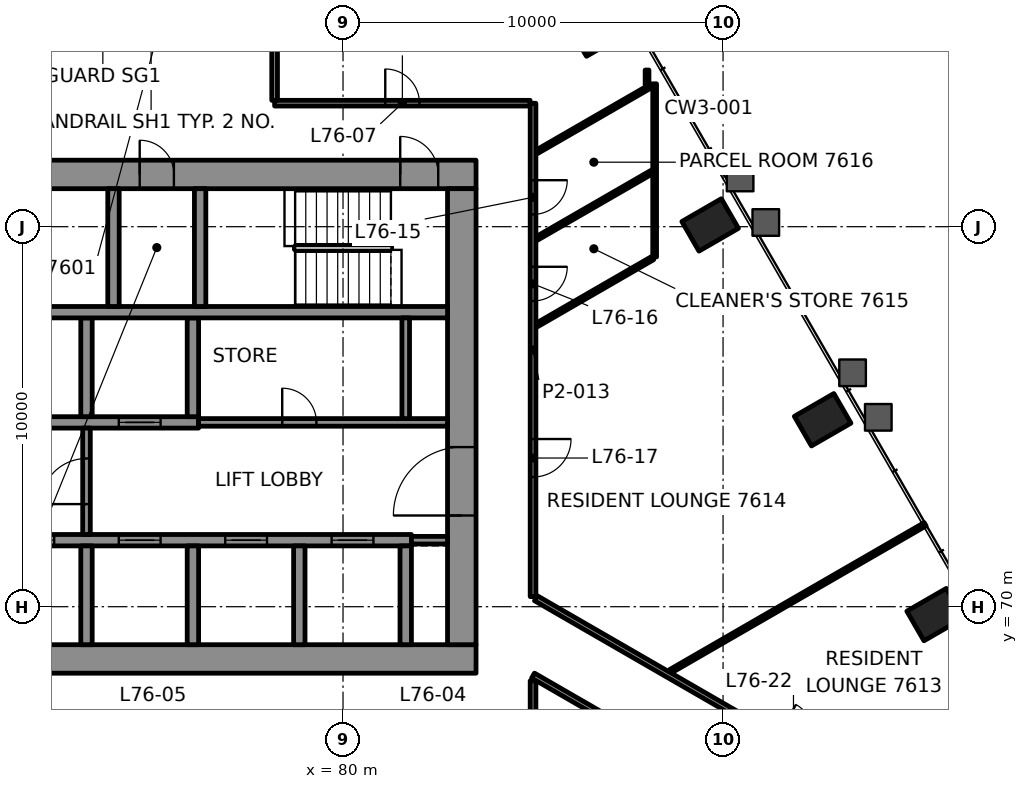
"""IFC4 building model, lengths in metres.
Left out: names, types, materials, properties, quantities, classifications, styles, units other than length and angle.
Written with IfcOpenShell. Run it as: python <this file> out.ifc"""

import sys

from ifc_helpers import new_model, si_unit, direction, frame, frame_2d, origin, origin_2d, place, context, subcontext, project, spatial, rectangle, hollow_rectangle, extrude, element, fill, save


model = new_model("IFC4")
c1 = context("Model", 3, precision=1e-05, world=origin(), true_north=direction((0.0, 1.0)))
c2 = subcontext(c1, "Body", "Model", "MODEL_VIEW")
j1 = project(units=[si_unit("LENGTHUNIT", "METRE"), si_unit("PLANEANGLEUNIT", "RADIAN")], contexts=[c1])
p1 = place(None, origin())
s1 = spatial("IfcSite", under=j1, at=p1, CompositionType="ELEMENT")
p2 = place(p1, origin())
s2 = spatial("IfcBuilding", under=s1, at=p2, CompositionType="ELEMENT")
p3 = place(p2, frame((0.0, 0.0, 312.6)))
s3 = spatial("IfcBuildingStorey", under=s2, at=p3, CompositionType="ELEMENT", Elevation=312.6)
for number, where, z_axis, x_axis in (
    (1, (95.581, 69.793, -0.0), (0.0, 0.0, 1.0), (-0.5, 0.866, 0.0)),
    (2, (92.621, 74.919, -0.0), (0.0, 0.0, 1.0), (-0.5, 0.866, 0.0)),
    (3, (89.661, 80.046, -0.0), (0.0, 0.0, 1.0), (-0.5, 0.866, 0.0)),
    (4, (86.701, 85.173, -0.0), (0.0, 0.0, 1.0), (-0.5, 0.866, 0.0)),
):
    element("IfcColumn", number, at=place(p3, frame(where, z_axis=z_axis, x_axis=x_axis)), inside=s3, PredefinedType="COLUMN", context=c2, shape_type="SweptSolid", body=[
        extrude(hollow_rectangle(XDim=0.9, YDim=1.2, WallThickness=0.06, at=origin_2d()), origin(), (0.0, 0.0, 1.0), 3.5),
    ])
p4 = place(p3, frame((66.5, 68.625, 0.0), z_axis=(0.0, 0.0, 1.0), x_axis=(1.0, 0.0, 0.0)))
e5 = element("IfcWall", 5, at=p4, inside=s3, PredefinedType="SHEAR", context=c2, shape_type="SweptSolid", body=[
    extrude(rectangle(XDim=17.0, YDim=0.75, at=frame_2d((8.5, 0.0))), origin(), (0.0, 0.0, 1.0), 3.3),
])
p5 = place(p4, frame((1.9, 0.0, 0.0)))
e6 = element("IfcOpeningElement", 6, at=p5, cuts=e5, PredefinedType="OPENING", context=c2, shape_type="SweptSolid", body=[
    extrude(rectangle(XDim=0.9, YDim=2.1, at=frame_2d((0.45, 1.05))), frame((0.0, 0.385, 0.0), z_axis=(0.0, -1.0, 0.0), x_axis=(1.0, 0.0, 0.0)), (0.0, 0.0, 1.0), 0.77),
])
p6 = place(p3, frame((66.5, 81.375, 0.0), z_axis=(0.0, 0.0, 1.0), x_axis=(1.0, 0.0, 0.0)))
e7 = element("IfcWall", 7, at=p6, inside=s3, PredefinedType="SHEAR", context=c2, shape_type="SweptSolid", body=[
    extrude(rectangle(XDim=17.0, YDim=0.75, at=frame_2d((8.5, 0.0))), origin(), (0.0, 0.0, 1.0), 3.3),
])
p7 = place(p6, frame((1.195, 0.0, 0.0)))
e8 = element("IfcOpeningElement", 8, at=p7, cuts=e7, PredefinedType="OPENING", context=c2, shape_type="SweptSolid", body=[
    extrude(rectangle(XDim=1.0, YDim=2.1, at=frame_2d((0.5, 1.05))), frame((0.0, 0.385, 0.0), z_axis=(0.0, -1.0, 0.0), x_axis=(1.0, 0.0, 0.0)), (0.0, 0.0, 1.0), 0.77),
])
p8 = place(p6, frame((15.005, 0.0, 0.0)))
e9 = element("IfcOpeningElement", 9, at=p8, cuts=e7, PredefinedType="OPENING", context=c2, shape_type="SweptSolid", body=[
    extrude(rectangle(XDim=1.0, YDim=2.1, at=frame_2d((0.5, 1.05))), frame((0.0, 0.385, 0.0), z_axis=(0.0, -1.0, 0.0), x_axis=(1.0, 0.0, 0.0)), (0.0, 0.0, 1.0), 0.77),
])
p9 = place(p6, frame((8.15, 0.0, 0.0)))
e10 = element("IfcOpeningElement", 10, at=p9, cuts=e7, PredefinedType="OPENING", context=c2, shape_type="SweptSolid", body=[
    extrude(rectangle(XDim=0.9, YDim=2.1, at=frame_2d((0.45, 1.05))), frame((0.0, 0.385, 0.0), z_axis=(0.0, -1.0, 0.0), x_axis=(1.0, 0.0, 0.0)), (0.0, 0.0, 1.0), 0.77),
])
p10 = place(p3, frame((83.125, 69.0, 0.0), z_axis=(0.0, 0.0, 1.0), x_axis=(0.0, 1.0, 0.0)))
e11 = element("IfcWall", 11, at=p10, inside=s3, PredefinedType="SHEAR", context=c2, shape_type="SweptSolid", body=[
    extrude(rectangle(XDim=12.0, YDim=0.75, at=frame_2d((6.0, 0.0))), origin(), (0.0, 0.0, 1.0), 3.3),
])
p11 = place(p10, frame((3.4, 0.0, 0.0)))
e12 = element("IfcOpeningElement", 12, at=p11, cuts=e11, PredefinedType="OPENING", context=c2, shape_type="SweptSolid", body=[
    extrude(rectangle(XDim=1.8, YDim=2.1, at=frame_2d((0.9, 1.05))), frame((0.0, 0.385, 0.0), z_axis=(0.0, -1.0, 0.0), x_axis=(1.0, 0.0, 0.0)), (0.0, 0.0, 1.0), 0.77),
])
p12 = place(p3, frame((70.3, 71.75, 0.0), z_axis=(0.0, 0.0, 1.0), x_axis=(1.0, 0.0, 0.0)))
e13 = element("IfcWall", 13, at=p12, inside=s3, PredefinedType="SHEAR", context=c2, shape_type="SweptSolid", body=[
    extrude(rectangle(XDim=11.5, YDim=0.3, at=frame_2d((5.75, 0.0))), origin(), (0.0, 0.0, 1.0), 3.3),
])
p13 = place(p12, frame((1.0, 0.0, 0.0)))
e14 = element("IfcOpeningElement", 14, at=p13, cuts=e13, PredefinedType="OPENING", context=c2, shape_type="SweptSolid", body=[
    extrude(rectangle(XDim=1.1, YDim=2.1, at=frame_2d((0.55, 1.05))), frame((0.0, 0.16, 0.0), z_axis=(0.0, -1.0, 0.0), x_axis=(1.0, 0.0, 0.0)), (0.0, 0.0, 1.0), 0.32),
])
p14 = place(p12, frame((3.8, 0.0, 0.0)))
e15 = element("IfcOpeningElement", 15, at=p14, cuts=e13, PredefinedType="OPENING", context=c2, shape_type="SweptSolid", body=[
    extrude(rectangle(XDim=1.1, YDim=2.1, at=frame_2d((0.55, 1.05))), frame((0.0, 0.16, 0.0), z_axis=(0.0, -1.0, 0.0), x_axis=(1.0, 0.0, 0.0)), (0.0, 0.0, 1.0), 0.32),
])
p15 = place(p12, frame((6.6, 0.0, 0.0)))
e16 = element("IfcOpeningElement", 16, at=p15, cuts=e13, PredefinedType="OPENING", context=c2, shape_type="SweptSolid", body=[
    extrude(rectangle(XDim=1.1, YDim=2.1, at=frame_2d((0.55, 1.05))), frame((0.0, 0.16, 0.0), z_axis=(0.0, -1.0, 0.0), x_axis=(1.0, 0.0, 0.0)), (0.0, 0.0, 1.0), 0.32),
])
p16 = place(p12, frame((9.4, 0.0, 0.0)))
e17 = element("IfcOpeningElement", 17, at=p16, cuts=e13, PredefinedType="OPENING", context=c2, shape_type="SweptSolid", body=[
    extrude(rectangle(XDim=1.1, YDim=2.1, at=frame_2d((0.55, 1.05))), frame((0.0, 0.16, 0.0), z_axis=(0.0, -1.0, 0.0), x_axis=(1.0, 0.0, 0.0)), (0.0, 0.0, 1.0), 0.32),
])
p17 = place(p3, frame((70.3, 74.85, 0.0), z_axis=(0.0, 0.0, 1.0), x_axis=(1.0, 0.0, 0.0)))
e18 = element("IfcWall", 18, at=p17, inside=s3, PredefinedType="SHEAR", context=c2, shape_type="SweptSolid", body=[
    extrude(rectangle(XDim=5.9, YDim=0.3, at=frame_2d((2.95, 0.0))), origin(), (0.0, 0.0, 1.0), 3.3),
])
p18 = place(p17, frame((3.8, 0.0, 0.0)))
e19 = element("IfcOpeningElement", 19, at=p18, cuts=e18, PredefinedType="OPENING", context=c2, shape_type="SweptSolid", body=[
    extrude(rectangle(XDim=1.1, YDim=2.1, at=frame_2d((0.55, 1.05))), frame((0.0, 0.16, 0.0), z_axis=(0.0, -1.0, 0.0), x_axis=(1.0, 0.0, 0.0)), (0.0, 0.0, 1.0), 0.32),
])
for number, where, z_axis, x_axis in (
    (20, (73.25, 69.0, 0.0), (0.0, 0.0, 1.0), (0.0, 1.0, 0.0)),
    (21, (73.25, 75.0, 0.0), (0.0, 0.0, 1.0), (0.0, 1.0, 0.0)),
    (22, (76.05, 69.0, 0.0), (0.0, 0.0, 1.0), (0.0, 1.0, 0.0)),
    (23, (76.05, 75.0, 0.0), (0.0, 0.0, 1.0), (0.0, 1.0, 0.0)),
    (24, (78.85, 69.0, 0.0), (0.0, 0.0, 1.0), (0.0, 1.0, 0.0)),
    (25, (81.65, 69.0, 0.0), (0.0, 0.0, 1.0), (0.0, 1.0, 0.0)),
):
    element("IfcWall", number, at=place(p3, frame(where, z_axis=z_axis, x_axis=x_axis)), inside=s3, PredefinedType="SHEAR", context=c2, shape_type="SweptSolid", body=[
        extrude(rectangle(XDim=2.6, YDim=0.3, at=frame_2d((1.3, 0.0))), origin(), (0.0, 0.0, 1.0), 3.3),
    ])
p19 = place(p3, frame((67.25, 77.75, 0.0), z_axis=(0.0, 0.0, 1.0), x_axis=(1.0, 0.0, 0.0)))
e26 = element("IfcWall", 26, at=p19, inside=s3, PredefinedType="SHEAR", context=c2, shape_type="SweptSolid", body=[
    extrude(rectangle(XDim=15.5, YDim=0.3, at=frame_2d((7.75, 0.0))), origin(), (0.0, 0.0, 1.0), 3.3),
])
p20 = place(p19, frame((0.445, 0.0, 0.0)))
e27 = element("IfcOpeningElement", 27, at=p20, cuts=e26, PredefinedType="OPENING", context=c2, shape_type="SweptSolid", body=[
    extrude(rectangle(XDim=1.0, YDim=2.1, at=frame_2d((0.5, 1.05))), frame((0.0, 0.16, 0.0), z_axis=(0.0, -1.0, 0.0), x_axis=(1.0, 0.0, 0.0)), (0.0, 0.0, 1.0), 0.32),
])
for number, where, z_axis, x_axis in (
    (28, (73.96, 77.9, 0.0), (0.0, 0.0, 1.0), (0.0, 1.0, 0.0)),
    (29, (76.24, 77.9, 0.0), (0.0, 0.0, 1.0), (0.0, 1.0, 0.0)),
):
    element("IfcWall", number, at=place(p3, frame(where, z_axis=z_axis, x_axis=x_axis)), inside=s3, PredefinedType="SHEAR", context=c2, shape_type="SweptSolid", body=[
        extrude(rectangle(XDim=3.1, YDim=0.3, at=frame_2d((1.55, 0.0))), origin(), (0.0, 0.0, 1.0), 3.3),
    ])
p21 = place(p3, frame((78.2, 83.25, 0.0), z_axis=(0.0, 0.0, 1.0), x_axis=(1.0, 0.0, 0.0)))
e30 = element("IfcWall", 30, at=p21, inside=s3, PredefinedType="PARTITIONING", context=c2, shape_type="SweptSolid", body=[
    extrude(rectangle(XDim=6.723, YDim=0.15, at=frame_2d((3.362, 0.0))), origin(), (0.0, 0.0, 1.0), 2.7),
])
p22 = place(p21, frame((2.911, 0.0, 0.0)))
e31 = element("IfcOpeningElement", 31, at=p22, cuts=e30, PredefinedType="OPENING", context=c2, shape_type="SweptSolid", body=[
    extrude(rectangle(XDim=0.9, YDim=2.1, at=frame_2d((0.45, 1.05))), frame((0.0, 0.085, 0.0), z_axis=(0.0, -1.0, 0.0), x_axis=(1.0, 0.0, 0.0)), (0.0, 0.0, 1.0), 0.17),
])
p23 = place(p3, frame((88.611, 68.298, 0.0), z_axis=(0.0, 0.0, 1.0), x_axis=(0.866026493871, 0.499998111909, 0.0)))
e32 = element("IfcWall", 32, at=p23, inside=s3, PredefinedType="PARTITIONING", context=c2, shape_type="SweptSolid", body=[
    extrude(rectangle(XDim=7.743, YDim=0.1, at=frame_2d((3.872, 0.0))), origin(), (0.0, 0.0, 1.0), 2.688),
])
p24 = place(p3, frame((85.101, 77.414, 0.0), z_axis=(0.0, 0.0, 1.0), x_axis=(0.866041242935, 0.499972564782, 0.0)))
e33 = element("IfcWall", 33, at=p24, inside=s3, PredefinedType="PARTITIONING", context=c2, shape_type="SweptSolid", body=[
    extrude(rectangle(XDim=3.521, YDim=0.1, at=frame_2d((1.76, 0.0))), origin(), (0.0, 0.0, 1.0), 2.7),
])
p25 = place(p3, frame((85.101, 79.692, 0.0), z_axis=(0.0, 0.0, 1.0), x_axis=(0.866017863565, 0.500013059815, 0.0)))
e34 = element("IfcWall", 34, at=p25, inside=s3, PredefinedType="PARTITIONING", context=c2, shape_type="SweptSolid", body=[
    extrude(rectangle(XDim=3.491, YDim=0.1, at=frame_2d((1.745, 0.0))), origin(), (0.0, 0.0, 1.0), 2.7),
])
p26 = place(p3, frame((85.101, 81.971, 0.0), z_axis=(0.0, 0.0, 1.0), x_axis=(0.866017863565, 0.500013059815, 0.0)))
e35 = element("IfcWall", 35, at=p26, inside=s3, PredefinedType="PARTITIONING", context=c2, shape_type="SweptSolid", body=[
    extrude(rectangle(XDim=3.491, YDim=0.1, at=frame_2d((1.745, 0.0))), origin(), (0.0, 0.0, 1.0), 2.688),
])
p27 = place(p3, frame((88.2, 79.203, 0.0), z_axis=(0.0, 0.0, 1.0), x_axis=(0.0, 1.0, 0.0)))
e36 = element("IfcWall", 36, at=p27, inside=s3, PredefinedType="PARTITIONING", context=c2, shape_type="SweptSolid", body=[
    extrude(rectangle(XDim=4.557, YDim=0.1, at=frame_2d((2.279, 0.0))), origin(), (0.0, 0.0, 1.0), 2.688),
])
p28 = place(p3, frame((88.0, 83.733, 0.0), z_axis=(0.0, 0.0, 1.0), x_axis=(0.0, 1.0, 0.0)))
e37 = element("IfcWall", 37, at=p28, inside=s3, PredefinedType="PARTITIONING", context=c2, shape_type="SweptSolid", body=[
    extrude(rectangle(XDim=0.39, YDim=0.1, at=frame_2d((0.195, 0.0))), origin(), (0.0, 0.0, 1.0), 2.7),
])
p29 = place(p3, frame((85.0, 66.825, 0.0), z_axis=(0.0, 0.0, 1.0), x_axis=(0.0, 1.0, 0.0)))
e38 = element("IfcWall", 38, at=p29, inside=s3, PredefinedType="PARTITIONING", context=c2, shape_type="SweptSolid", body=[
    extrude(rectangle(XDim=1.226, YDim=0.15, at=frame_2d((0.613, 0.0))), origin(), (0.0, 0.0, 1.0), 2.697),
])
p30 = place(p3, frame((85.0, 83.248, 0.0), z_axis=(0.0, 0.0, 1.0), x_axis=(0.0, -1.0, 0.0)))
e39 = element("IfcWall", 39, at=p30, inside=s3, PredefinedType="PARTITIONING", context=c2, shape_type="SweptSolid", body=[
    extrude(rectangle(XDim=12.982, YDim=0.15, at=frame_2d((6.491, 0.0))), origin(), (0.0, 0.0, 1.0), 2.7),
])
p31 = place(p30, frame((2.024, 0.0, 0.0)))
e40 = element("IfcOpeningElement", 40, at=p31, cuts=e39, PredefinedType="OPENING", context=c2, shape_type="SweptSolid", body=[
    extrude(rectangle(XDim=0.9, YDim=2.1, at=frame_2d((0.45, 1.05))), frame((0.0, 0.085, 0.0), z_axis=(0.0, -1.0, 0.0), x_axis=(1.0, 0.0, 0.0)), (0.0, 0.0, 1.0), 0.17),
])
p32 = place(p30, frame((4.303, 0.0, 0.0)))
e41 = element("IfcOpeningElement", 41, at=p32, cuts=e39, PredefinedType="OPENING", context=c2, shape_type="SweptSolid", body=[
    extrude(rectangle(XDim=0.9, YDim=2.1, at=frame_2d((0.45, 1.05))), frame((0.0, 0.085, 0.0), z_axis=(0.0, -1.0, 0.0), x_axis=(1.0, 0.0, 0.0)), (0.0, 0.0, 1.0), 0.17),
])
p33 = place(p30, frame((8.836, 0.0, 0.0)))
e42 = element("IfcOpeningElement", 42, at=p33, cuts=e39, PredefinedType="OPENING", context=c2, shape_type="SweptSolid", body=[
    extrude(rectangle(XDim=1.0, YDim=2.1, at=frame_2d((0.5, 1.05))), frame((0.0, 0.085, 0.0), z_axis=(0.0, -1.0, 0.0), x_axis=(1.0, 0.0, 0.0)), (0.0, 0.0, 1.0), 0.17),
])
p34 = place(p3, frame((78.2, 83.325, 0.0), z_axis=(0.0, 0.0, 1.0), x_axis=(0.0, 1.0, 0.0)))
e43 = element("IfcWall", 43, at=p34, inside=s3, PredefinedType="PARTITIONING", context=c2, shape_type="SweptSolid", body=[
    extrude(rectangle(XDim=2.975, YDim=0.15, at=frame_2d((1.488, 0.0))), origin(), (0.0, 0.0, 1.0), 2.7),
])
p35 = place(p3, frame((85.075, 70.222, 0.0), z_axis=(0.0, 0.0, 1.0), x_axis=(0.866032051089, -0.499988486354, 0.0)))
e44 = element("IfcWall", 44, at=p35, inside=s3, PredefinedType="PARTITIONING", context=c2, shape_type="SweptSolid", body=[
    extrude(rectangle(XDim=11.889, YDim=0.15, at=frame_2d((5.945, 0.0))), origin(), (0.0, 0.0, 1.0), 2.7),
])
p36 = place(p35, frame((7.326, 0.0, 0.0)))
e45 = element("IfcOpeningElement", 45, at=p36, cuts=e44, PredefinedType="OPENING", context=c2, shape_type="SweptSolid", body=[
    extrude(rectangle(XDim=1.0, YDim=2.1, at=frame_2d((0.5, 1.05))), frame((0.0, 0.085, 0.0), z_axis=(0.0, -1.0, 0.0), x_axis=(1.0, 0.0, 0.0)), (0.0, 0.0, 1.0), 0.17),
])
p37 = place(p3, frame((94.472, 62.719, 0.0), z_axis=(0.0, 0.0, 1.0), x_axis=(-0.866029834468, 0.499992325753, 0.0)))
e46 = element("IfcWall", 46, at=p37, inside=s3, PredefinedType="PARTITIONING", context=c2, shape_type="SweptSolid", body=[
    extrude(rectangle(XDim=10.937, YDim=0.15, at=frame_2d((5.469, 0.0))), origin(), (0.0, 0.0, 1.0), 2.697),
])
p38 = place(p3, frame((81.8, 71.75, 0.0), z_axis=(0.0, 0.0, 1.0), x_axis=(1.0, 0.0, 0.0)))
e47 = element("IfcWall", 47, at=p38, inside=s3, PredefinedType="PARTITIONING", context=c2, shape_type="SweptSolid", body=[
    extrude(rectangle(XDim=0.95, YDim=0.2, at=frame_2d((0.475, 0.0))), origin(), (0.0, 0.0, 1.0), 3.3),
])
p39 = place(p3, frame((76.2, 74.85, 0.0), z_axis=(0.0, 0.0, 1.0), x_axis=(1.0, 0.0, 0.0)))
e48 = element("IfcWall", 48, at=p39, inside=s3, PredefinedType="PARTITIONING", context=c2, shape_type="SweptSolid", body=[
    extrude(rectangle(XDim=6.55, YDim=0.2, at=frame_2d((3.275, 0.0))), origin(), (0.0, 0.0, 1.0), 3.3),
])
p40 = place(p39, frame((2.2, 0.0, 0.0)))
e49 = element("IfcOpeningElement", 49, at=p40, cuts=e48, PredefinedType="OPENING", context=c2, shape_type="SweptSolid", body=[
    extrude(rectangle(XDim=0.9, YDim=2.1, at=frame_2d((0.45, 1.05))), frame((0.0, 0.11, 0.0), z_axis=(0.0, -1.0, 0.0), x_axis=(1.0, 0.0, 0.0)), (0.0, 0.0, 1.0), 0.22),
])
p41 = place(p3, frame((73.25, 71.9, 0.0), z_axis=(0.0, 0.0, 1.0), x_axis=(0.0, 1.0, 0.0)))
e50 = element("IfcWall", 50, at=p41, inside=s3, PredefinedType="PARTITIONING", context=c2, shape_type="SweptSolid", body=[
    extrude(rectangle(XDim=2.8, YDim=0.2, at=frame_2d((1.4, 0.0))), origin(), (0.0, 0.0, 1.0), 3.3),
])
p42 = place(p41, frame((0.8, 0.0, 0.0)))
e51 = element("IfcOpeningElement", 51, at=p42, cuts=e50, PredefinedType="OPENING", context=c2, shape_type="SweptSolid", body=[
    extrude(rectangle(XDim=1.2, YDim=2.1, at=frame_2d((0.6, 1.05))), frame((0.0, 0.11, 0.0), z_axis=(0.0, -1.0, 0.0), x_axis=(1.0, 0.0, 0.0)), (0.0, 0.0, 1.0), 0.22),
])
p43 = place(p3, frame((81.65, 74.95, 0.0), z_axis=(0.0, 0.0, 1.0), x_axis=(0.0, 1.0, 0.0)))
e52 = element("IfcWall", 52, at=p43, inside=s3, PredefinedType="PARTITIONING", context=c2, shape_type="SweptSolid", body=[
    extrude(rectangle(XDim=2.65, YDim=0.2, at=frame_2d((1.325, 0.0))), origin(), (0.0, 0.0, 1.0), 3.3),
])
p44 = place(p22, origin())
e53 = element("IfcDoor", 53, at=p44, inside=s3, OperationType="SINGLE_SWING_RIGHT", PredefinedType="DOOR", context=c2, shape_type="SweptSolid", body=[
    extrude(rectangle(XDim=0.9, YDim=2.1, at=frame_2d((0.45, 1.05))), frame((0.0, 0.025, 0.0), z_axis=(0.0, -1.0, 0.0), x_axis=(1.0, 0.0, 0.0)), (0.0, 0.0, 1.0), 0.05),
])
fill(e31, e53)
p45 = place(p31, origin())
e54 = element("IfcDoor", 54, at=p45, inside=s3, OperationType="SINGLE_SWING_RIGHT", PredefinedType="DOOR", context=c2, shape_type="SweptSolid", body=[
    extrude(rectangle(XDim=0.9, YDim=2.1, at=frame_2d((0.45, 1.05))), frame((0.0, 0.025, 0.0), z_axis=(0.0, -1.0, 0.0), x_axis=(1.0, 0.0, 0.0)), (0.0, 0.0, 1.0), 0.05),
])
fill(e40, e54)
p46 = place(p32, origin())
e55 = element("IfcDoor", 55, at=p46, inside=s3, OperationType="SINGLE_SWING_LEFT", PredefinedType="DOOR", context=c2, shape_type="SweptSolid", body=[
    extrude(rectangle(XDim=0.9, YDim=2.1, at=frame_2d((0.45, 1.05))), frame((0.0, 0.025, 0.0), z_axis=(0.0, -1.0, 0.0), x_axis=(1.0, 0.0, 0.0)), (0.0, 0.0, 1.0), 0.05),
])
fill(e41, e55)
p47 = place(p33, origin())
e56 = element("IfcDoor", 56, at=p47, inside=s3, OperationType="SINGLE_SWING_RIGHT", PredefinedType="DOOR", context=c2, shape_type="SweptSolid", body=[
    extrude(rectangle(XDim=1.0, YDim=2.1, at=frame_2d((0.5, 1.05))), frame((0.0, 0.025, 0.0), z_axis=(0.0, -1.0, 0.0), x_axis=(1.0, 0.0, 0.0)), (0.0, 0.0, 1.0), 0.05),
])
fill(e42, e56)
p48 = place(p13, origin())
e57 = element("IfcDoor", 57, at=p48, inside=s3, OperationType="DOUBLE_DOOR_SLIDING", PredefinedType="DOOR", context=c2, shape_type="SweptSolid", body=[
    extrude(rectangle(XDim=1.1, YDim=2.1, at=frame_2d((0.55, 1.05))), frame((0.0, 0.025, 0.0), z_axis=(0.0, -1.0, 0.0), x_axis=(1.0, 0.0, 0.0)), (0.0, 0.0, 1.0), 0.05),
])
fill(e14, e57)
p49 = place(p14, origin())
e58 = element("IfcDoor", 58, at=p49, inside=s3, OperationType="DOUBLE_DOOR_SLIDING", PredefinedType="DOOR", context=c2, shape_type="SweptSolid", body=[
    extrude(rectangle(XDim=1.1, YDim=2.1, at=frame_2d((0.55, 1.05))), frame((0.0, 0.025, 0.0), z_axis=(0.0, -1.0, 0.0), x_axis=(1.0, 0.0, 0.0)), (0.0, 0.0, 1.0), 0.05),
])
fill(e15, e58)
p50 = place(p15, origin())
e59 = element("IfcDoor", 59, at=p50, inside=s3, OperationType="DOUBLE_DOOR_SLIDING", PredefinedType="DOOR", context=c2, shape_type="SweptSolid", body=[
    extrude(rectangle(XDim=1.1, YDim=2.1, at=frame_2d((0.55, 1.05))), frame((0.0, 0.025, 0.0), z_axis=(0.0, -1.0, 0.0), x_axis=(1.0, 0.0, 0.0)), (0.0, 0.0, 1.0), 0.05),
])
fill(e16, e59)
p51 = place(p16, origin())
e60 = element("IfcDoor", 60, at=p51, inside=s3, OperationType="DOUBLE_DOOR_SLIDING", PredefinedType="DOOR", context=c2, shape_type="SweptSolid", body=[
    extrude(rectangle(XDim=1.1, YDim=2.1, at=frame_2d((0.55, 1.05))), frame((0.0, 0.025, 0.0), z_axis=(0.0, -1.0, 0.0), x_axis=(1.0, 0.0, 0.0)), (0.0, 0.0, 1.0), 0.05),
])
fill(e17, e60)
p52 = place(p18, origin())
e61 = element("IfcDoor", 61, at=p52, inside=s3, OperationType="DOUBLE_DOOR_SLIDING", PredefinedType="DOOR", context=c2, shape_type="SweptSolid", body=[
    extrude(rectangle(XDim=1.1, YDim=2.1, at=frame_2d((0.55, 1.05))), frame((0.0, 0.025, 0.0), z_axis=(0.0, -1.0, 0.0), x_axis=(1.0, 0.0, 0.0)), (0.0, 0.0, 1.0), 0.05),
])
fill(e19, e61)
p53 = place(p8, origin())
e62 = element("IfcDoor", 62, at=p53, inside=s3, OperationType="SINGLE_SWING_LEFT", PredefinedType="DOOR", context=c2, shape_type="SweptSolid", body=[
    extrude(rectangle(XDim=1.0, YDim=2.1, at=frame_2d((0.5, 1.05))), frame((0.0, 0.095, 0.0), z_axis=(0.0, -1.0, 0.0), x_axis=(1.0, 0.0, 0.0)), (0.0, 0.0, 1.0), 0.19),
])
fill(e9, e62)
p54 = place(p42, origin())
e63 = element("IfcDoor", 63, at=p54, inside=s3, OperationType="SINGLE_SWING_LEFT", PredefinedType="DOOR", context=c2, shape_type="SweptSolid", body=[
    extrude(rectangle(XDim=1.2, YDim=2.1, at=frame_2d((0.6, 1.05))), frame((0.0, 0.025, 0.0), z_axis=(0.0, -1.0, 0.0), x_axis=(1.0, 0.0, 0.0)), (0.0, 0.0, 1.0), 0.05),
])
fill(e51, e63)
p55 = place(p11, origin())
e64 = element("IfcDoor", 64, at=p55, inside=s3, OperationType="SINGLE_SWING_LEFT", PredefinedType="DOOR", context=c2, shape_type="SweptSolid", body=[
    extrude(rectangle(XDim=1.8, YDim=2.1, at=frame_2d((0.9, 1.05))), frame((0.0, 0.095, 0.0), z_axis=(0.0, -1.0, 0.0), x_axis=(1.0, 0.0, 0.0)), (0.0, 0.0, 1.0), 0.19),
])
fill(e12, e64)
p56 = place(p40, origin())
e65 = element("IfcDoor", 65, at=p56, inside=s3, OperationType="SINGLE_SWING_LEFT", PredefinedType="DOOR", context=c2, shape_type="SweptSolid", body=[
    extrude(rectangle(XDim=0.9, YDim=2.1, at=frame_2d((0.45, 1.05))), frame((0.0, 0.025, 0.0), z_axis=(0.0, -1.0, 0.0), x_axis=(1.0, 0.0, 0.0)), (0.0, 0.0, 1.0), 0.05),
])
fill(e49, e65)
p57 = place(p9, origin())
e66 = element("IfcDoor", 66, at=p57, inside=s3, OperationType="SINGLE_SWING_RIGHT", PredefinedType="DOOR", context=c2, shape_type="SweptSolid", body=[
    extrude(rectangle(XDim=0.9, YDim=2.1, at=frame_2d((0.45, 1.05))), frame((0.0, 0.095, 0.0), z_axis=(0.0, -1.0, 0.0), x_axis=(1.0, 0.0, 0.0)), (0.0, 0.0, 1.0), 0.19),
])
fill(e10, e66)
save(model, sys.argv[1])
